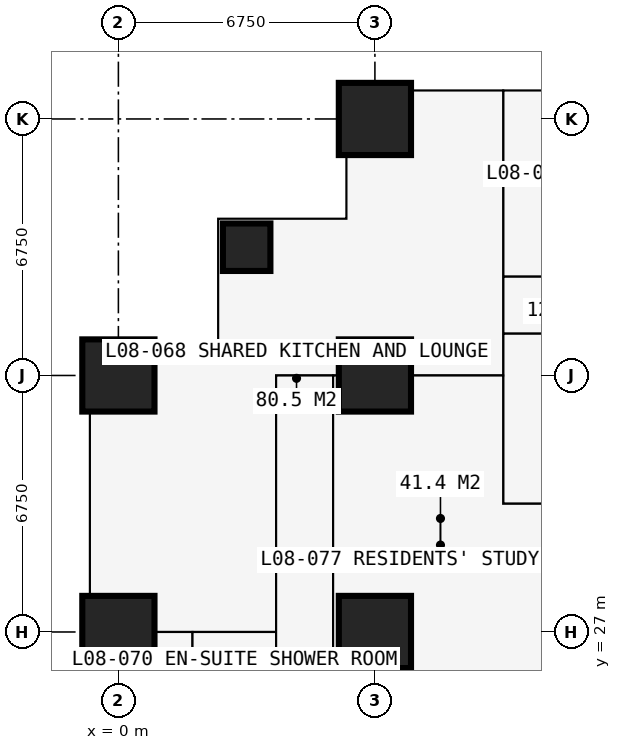
"""IFC4 building model, lengths in metres.
Left out: names, types, materials, properties, quantities, classifications, styles, units other than length and angle.
Written with IfcOpenShell. Run it as: python <this file> out.ifc"""

import sys

from ifc_helpers import new_model, si_unit, direction, frame, frame_2d, origin, origin_2d, place, context, subcontext, project, spatial, rectangle, extrude, element, fill, save


model = new_model("IFC4")
c1 = context("Model", 3, precision=1e-05, world=origin(), true_north=direction((0.0, 1.0)))
c2 = subcontext(c1, "Body", "Model", "MODEL_VIEW")
j1 = project(units=[si_unit("LENGTHUNIT", "METRE"), si_unit("PLANEANGLEUNIT", "RADIAN")], contexts=[c1])
p1 = place(None, origin())
s1 = spatial("IfcSite", under=j1, at=p1, CompositionType="ELEMENT")
p2 = place(p1, origin())
s2 = spatial("IfcBuilding", under=s1, at=p2, CompositionType="ELEMENT")
p3 = place(p2, frame((0.0, 0.0, 32.4)))
s3 = spatial("IfcBuildingStorey", under=s2, at=p3, CompositionType="ELEMENT", Elevation=32.4)
for number, where, z_axis, x_axis in (
    (1, (0.0, 27.0, 0.0), (0.0, 0.0, 1.0), (1.0, 0.0, 0.0)),
    (2, (0.0, 33.75, 0.0), (0.0, 0.0, 1.0), (1.0, 0.0, 0.0)),
):
    element("IfcColumn", number, at=place(p3, frame(where, z_axis=z_axis, x_axis=x_axis)), inside=s3, PredefinedType="COLUMN", context=c2, shape_type="SweptSolid", body=[
        extrude(rectangle(XDim=1.9, YDim=1.9, at=origin_2d()), origin(), (0.0, 0.0, 1.0), 3.6),
    ])
p4 = place(p3, frame((3.375, 37.125, 0.0), z_axis=(0.0, 0.0, 1.0), x_axis=(1.0, 0.0, 0.0)))
e3 = element("IfcColumn", 3, at=p4, inside=s3, PredefinedType="COLUMN", context=c2, shape_type="SweptSolid", body=[
    extrude(rectangle(XDim=1.25, YDim=1.25, at=origin_2d()), origin(), (0.0, 0.0, 1.0), 3.6),
])
for number, where, z_axis, x_axis in (
    (4, (6.75, 27.0, 0.0), (0.0, 0.0, 1.0), (1.0, 0.0, 0.0)),
    (5, (6.75, 33.75, 0.0), (0.0, 0.0, 1.0), (1.0, 0.0, 0.0)),
    (6, (6.75, 40.5, 0.0), (0.0, 0.0, 1.0), (1.0, 0.0, 0.0)),
):
    element("IfcColumn", number, at=place(p3, frame(where, z_axis=z_axis, x_axis=x_axis)), inside=s3, PredefinedType="COLUMN", context=c2, shape_type="SweptSolid", body=[
        extrude(rectangle(XDim=1.9, YDim=1.9, at=origin_2d()), origin(), (0.0, 0.0, 1.0), 3.6),
    ])
p5 = place(p3, frame((6.0, 41.25, 0.0), z_axis=(0.0, 0.0, 1.0), x_axis=(0.0, -1.0, 0.0)))
e7 = element("IfcWall", 7, at=p5, inside=s3, PredefinedType="SOLIDWALL", context=c2, shape_type="SweptSolid", body=[
    extrude(rectangle(XDim=3.375, YDim=0.3, at=frame_2d((1.688, 0.0))), origin(), (0.0, 0.0, 1.0), 3.375),
])
p6 = place(p5, frame((1.857, 0.0, 0.9)))
e8 = element("IfcOpeningElement", 8, at=p6, cuts=e7, PredefinedType="OPENING", context=c2, shape_type="SweptSolid", body=[
    extrude(rectangle(XDim=1.2, YDim=1.8, at=frame_2d((0.6, 0.9))), frame((0.0, 0.16, 0.0), z_axis=(0.0, -1.0, 0.0), x_axis=(1.0, 0.0, 0.0)), (0.0, 0.0, 1.0), 0.32),
])
p7 = place(p3, frame((6.0, 37.875, 0.0), z_axis=(0.0, 0.0, 1.0), x_axis=(-1.0, 0.0, 0.0)))
e9 = element("IfcWall", 9, at=p7, inside=s3, PredefinedType="SOLIDWALL", context=c2, shape_type="SweptSolid", body=[
    extrude(rectangle(XDim=3.375, YDim=0.3, at=frame_2d((1.688, 0.0))), origin(), (0.0, 0.0, 1.0), 3.375),
])
p8 = place(p7, frame((0.788, 0.0, 0.6)))
e10 = element("IfcOpeningElement", 10, at=p8, cuts=e9, PredefinedType="OPENING", context=c2, shape_type="SweptSolid", body=[
    extrude(rectangle(XDim=1.8, YDim=2.1, at=frame_2d((0.9, 1.05))), frame((0.0, 0.16, 0.0), z_axis=(0.0, -1.0, 0.0), x_axis=(1.0, 0.0, 0.0)), (0.0, 0.0, 1.0), 0.32),
])
p9 = place(p3, frame((2.625, 37.875, 0.0), z_axis=(0.0, 0.0, 1.0), x_axis=(0.0, -1.0, 0.0)))
e11 = element("IfcWall", 11, at=p9, inside=s3, PredefinedType="SOLIDWALL", context=c2, shape_type="SweptSolid", body=[
    extrude(rectangle(XDim=3.375, YDim=0.3, at=frame_2d((1.688, 0.0))), origin(), (0.0, 0.0, 1.0), 3.375),
])
p10 = place(p9, frame((0.788, 0.0, 0.6)))
e12 = element("IfcOpeningElement", 12, at=p10, cuts=e11, PredefinedType="OPENING", context=c2, shape_type="SweptSolid", body=[
    extrude(rectangle(XDim=1.8, YDim=2.1, at=frame_2d((0.9, 1.05))), frame((0.0, 0.16, 0.0), z_axis=(0.0, -1.0, 0.0), x_axis=(1.0, 0.0, 0.0)), (0.0, 0.0, 1.0), 0.32),
])
p11 = place(p3, frame((2.625, 34.5, 0.0), z_axis=(0.0, 0.0, 1.0), x_axis=(-1.0, 0.0, 0.0)))
e13 = element("IfcWall", 13, at=p11, inside=s3, PredefinedType="SOLIDWALL", context=c2, shape_type="SweptSolid", body=[
    extrude(rectangle(XDim=3.375, YDim=0.3, at=frame_2d((1.688, 0.0))), origin(), (0.0, 0.0, 1.0), 3.375),
])
p12 = place(p11, frame((0.317, 0.0, 0.9)))
e14 = element("IfcOpeningElement", 14, at=p12, cuts=e13, PredefinedType="OPENING", context=c2, shape_type="SweptSolid", body=[
    extrude(rectangle(XDim=1.2, YDim=1.8, at=frame_2d((0.6, 0.9))), frame((0.0, 0.16, 0.0), z_axis=(0.0, -1.0, 0.0), x_axis=(1.0, 0.0, 0.0)), (0.0, 0.0, 1.0), 0.32),
])
p13 = place(p3, frame((-0.734, 27.0, 0.0), z_axis=(0.0, 0.0, 1.0), x_axis=(1.0, 0.0, 0.0)))
e15 = element("IfcWall", 15, at=p13, inside=s3, PredefinedType="PARTITIONING", context=c2, shape_type="SweptSolid", body=[
    extrude(rectangle(XDim=4.884, YDim=0.15, at=frame_2d((2.442, 0.0))), origin(), (0.0, 0.0, 1.0), 2.61),
])
p14 = place(p3, frame((1.95, 25.0, 0.0), z_axis=(0.0, 0.0, 1.0), x_axis=(0.0, 1.0, 0.0)))
e16 = element("IfcWall", 16, at=p14, inside=s3, PredefinedType="PARTITIONING", context=c2, shape_type="SweptSolid", body=[
    extrude(rectangle(XDim=2.0, YDim=0.1, at=frame_2d((1.0, 0.0))), origin(), (0.0, 0.0, 1.0), 3.375),
])
p15 = place(p3, frame((4.15, 10.125, 0.0), z_axis=(0.0, 0.0, 1.0), x_axis=(0.0, 1.0, 0.0)))
e17 = element("IfcWall", 17, at=p15, inside=s3, PredefinedType="PARTITIONING", context=c2, shape_type="SweptSolid", body=[
    extrude(rectangle(XDim=23.625, YDim=0.15, at=frame_2d((11.812, 0.0))), origin(), (0.0, 0.0, 1.0), 3.375),
])
p16 = place(p15, frame((19.775, 0.0, 0.0)))
e18 = element("IfcOpeningElement", 18, at=p16, cuts=e17, PredefinedType="OPENING", context=c2, shape_type="SweptSolid", body=[
    extrude(rectangle(XDim=1.0, YDim=2.2, at=frame_2d((0.5, 1.1))), frame((0.0, 0.085, 0.0), z_axis=(0.0, -1.0, 0.0), x_axis=(1.0, 0.0, 0.0)), (0.0, 0.0, 1.0), 0.17),
])
p17 = place(p15, frame((13.7, 0.0, 0.0)))
e19 = element("IfcOpeningElement", 19, at=p17, cuts=e17, PredefinedType="OPENING", context=c2, shape_type="SweptSolid", body=[
    extrude(rectangle(XDim=0.95, YDim=2.2, at=frame_2d((0.475, 1.1))), frame((0.0, 0.085, 0.0), z_axis=(0.0, -1.0, 0.0), x_axis=(1.0, 0.0, 0.0)), (0.0, 0.0, 1.0), 0.17),
])
p18 = place(p15, frame((4.2, 0.0, 0.0)))
e20 = element("IfcOpeningElement", 20, at=p18, cuts=e17, PredefinedType="OPENING", context=c2, shape_type="SweptSolid", body=[
    extrude(rectangle(XDim=0.95, YDim=2.2, at=frame_2d((0.475, 1.1))), frame((0.0, 0.085, 0.0), z_axis=(0.0, -1.0, 0.0), x_axis=(1.0, 0.0, 0.0)), (0.0, 0.0, 1.0), 0.17),
])
p19 = place(p15, frame((10.95, 0.0, 0.0)))
e21 = element("IfcOpeningElement", 21, at=p19, cuts=e17, PredefinedType="OPENING", context=c2, shape_type="SweptSolid", body=[
    extrude(rectangle(XDim=0.95, YDim=2.2, at=frame_2d((0.475, 1.1))), frame((0.0, 0.085, 0.0), z_axis=(0.0, -1.0, 0.0), x_axis=(1.0, 0.0, 0.0)), (0.0, 0.0, 1.0), 0.17),
])
p20 = place(p3, frame((4.15, 33.75, 0.0), z_axis=(0.0, 0.0, 1.0), x_axis=(1.0, 0.0, 0.0)))
e22 = element("IfcWall", 22, at=p20, inside=s3, PredefinedType="PARTITIONING", context=c2, shape_type="SweptSolid", body=[
    extrude(rectangle(XDim=5.975, YDim=0.15, at=frame_2d((2.988, 0.0))), origin(), (0.0, 0.0, 1.0), 2.877),
])
p21 = place(p3, frame((5.65, 25.725, 0.0), z_axis=(0.0, 0.0, 1.0), x_axis=(0.0, 1.0, 0.0)))
e23 = element("IfcWall", 23, at=p21, inside=s3, PredefinedType="PARTITIONING", context=c2, shape_type="SweptSolid", body=[
    extrude(rectangle(XDim=8.025, YDim=0.15, at=frame_2d((4.012, 0.0))), origin(), (0.0, 0.0, 1.0), 3.375),
])
p22 = place(p3, frame((10.125, 30.375, 0.0), z_axis=(0.0, 0.0, 1.0), x_axis=(0.0, 1.0, 0.0)))
e24 = element("IfcWall", 24, at=p22, inside=s3, PredefinedType="PARTITIONING", context=c2, shape_type="SweptSolid", body=[
    extrude(rectangle(XDim=10.859, YDim=0.15, at=frame_2d((5.429, 0.0))), origin(), (0.0, 0.0, 1.0), 3.375),
])
p23 = place(p3, frame((10.125, 30.375, 0.0), z_axis=(0.0, 0.0, 1.0), x_axis=(1.0, 0.0, 0.0)))
e25 = element("IfcWall", 25, at=p23, inside=s3, PredefinedType="PARTITIONING", context=c2, shape_type="SweptSolid", body=[
    extrude(rectangle(XDim=1.175, YDim=0.15, at=frame_2d((0.587, 0.0))), origin(), (0.0, 0.0, 1.0), 3.375),
])
p24 = place(p3, frame((10.125, 34.85, 0.0), z_axis=(0.0, 0.0, 1.0), x_axis=(1.0, 0.0, 0.0)))
e26 = element("IfcWall", 26, at=p24, inside=s3, PredefinedType="PARTITIONING", context=c2, shape_type="SweptSolid", body=[
    extrude(rectangle(XDim=10.762, YDim=0.15, at=frame_2d((5.381, 0.0))), origin(), (0.0, 0.0, 1.0), 3.375),
])
p25 = place(p24, frame((4.9, 0.0, 0.0)))
e27 = element("IfcOpeningElement", 27, at=p25, cuts=e26, PredefinedType="OPENING", context=c2, shape_type="SweptSolid", body=[
    extrude(rectangle(XDim=0.95, YDim=2.2, at=frame_2d((0.475, 1.1))), frame((0.0, 0.085, 0.0), z_axis=(0.0, -1.0, 0.0), x_axis=(1.0, 0.0, 0.0)), (0.0, 0.0, 1.0), 0.17),
])
p26 = place(p3, frame((10.125, 36.35, 0.0), z_axis=(0.0, 0.0, 1.0), x_axis=(1.0, 0.0, 0.0)))
e28 = element("IfcWall", 28, at=p26, inside=s3, PredefinedType="PARTITIONING", context=c2, shape_type="SweptSolid", body=[
    extrude(rectangle(XDim=23.625, YDim=0.1, at=frame_2d((11.812, 0.0))), origin(), (0.0, 0.0, 1.0), 3.375),
])
p27 = place(p26, frame((20.5, 0.0, 0.0)))
e29 = element("IfcOpeningElement", 29, at=p27, cuts=e28, PredefinedType="OPENING", context=c2, shape_type="SweptSolid", body=[
    extrude(rectangle(XDim=0.95, YDim=2.2, at=frame_2d((0.475, 1.1))), frame((0.0, 0.06, 0.0), z_axis=(0.0, -1.0, 0.0), x_axis=(1.0, 0.0, 0.0)), (0.0, 0.0, 1.0), 0.12),
])
p28 = place(p26, frame((17.125, 0.0, 0.0)))
e30 = element("IfcOpeningElement", 30, at=p28, cuts=e28, PredefinedType="OPENING", context=c2, shape_type="SweptSolid", body=[
    extrude(rectangle(XDim=0.95, YDim=2.2, at=frame_2d((0.475, 1.1))), frame((0.0, 0.06, 0.0), z_axis=(0.0, -1.0, 0.0), x_axis=(1.0, 0.0, 0.0)), (0.0, 0.0, 1.0), 0.12),
])
p29 = place(p26, frame((13.7, 0.0, 0.0)))
e31 = element("IfcOpeningElement", 31, at=p29, cuts=e28, PredefinedType="OPENING", context=c2, shape_type="SweptSolid", body=[
    extrude(rectangle(XDim=0.95, YDim=2.2, at=frame_2d((0.475, 1.1))), frame((0.0, 0.06, 0.0), z_axis=(0.0, -1.0, 0.0), x_axis=(1.0, 0.0, 0.0)), (0.0, 0.0, 1.0), 0.12),
])
p30 = place(p26, frame((0.2, 0.0, 0.0)))
e32 = element("IfcOpeningElement", 32, at=p30, cuts=e28, PredefinedType="OPENING", context=c2, shape_type="SweptSolid", body=[
    extrude(rectangle(XDim=0.95, YDim=2.2, at=frame_2d((0.475, 1.1))), frame((0.0, 0.06, 0.0), z_axis=(0.0, -1.0, 0.0), x_axis=(1.0, 0.0, 0.0)), (0.0, 0.0, 1.0), 0.12),
])
p31 = place(p26, frame((3.625, 0.0, 0.0)))
e33 = element("IfcOpeningElement", 33, at=p31, cuts=e28, PredefinedType="OPENING", context=c2, shape_type="SweptSolid", body=[
    extrude(rectangle(XDim=0.95, YDim=2.2, at=frame_2d((0.475, 1.1))), frame((0.0, 0.06, 0.0), z_axis=(0.0, -1.0, 0.0), x_axis=(1.0, 0.0, 0.0)), (0.0, 0.0, 1.0), 0.12),
])
p32 = place(p26, frame((7.0, 0.0, 0.0)))
e34 = element("IfcOpeningElement", 34, at=p32, cuts=e28, PredefinedType="OPENING", context=c2, shape_type="SweptSolid", body=[
    extrude(rectangle(XDim=0.95, YDim=2.2, at=frame_2d((0.475, 1.1))), frame((0.0, 0.06, 0.0), z_axis=(0.0, -1.0, 0.0), x_axis=(1.0, 0.0, 0.0)), (0.0, 0.0, 1.0), 0.12),
])
p33 = place(p26, frame((10.375, 0.0, 0.0)))
e35 = element("IfcOpeningElement", 35, at=p33, cuts=e28, PredefinedType="OPENING", context=c2, shape_type="SweptSolid", body=[
    extrude(rectangle(XDim=0.95, YDim=2.2, at=frame_2d((0.475, 1.1))), frame((0.0, 0.06, 0.0), z_axis=(0.0, -1.0, 0.0), x_axis=(1.0, 0.0, 0.0)), (0.0, 0.0, 1.0), 0.12),
])
p34 = place(p6, origin())
e36 = element("IfcWindow", 36, at=p34, inside=s3, PartitioningType="SINGLE_PANEL", PredefinedType="WINDOW", context=c2, shape_type="SweptSolid", body=[
    extrude(rectangle(XDim=1.2, YDim=1.8, at=frame_2d((0.6, 0.9))), frame((0.0, 0.03, 0.0), z_axis=(0.0, -1.0, 0.0), x_axis=(1.0, 0.0, 0.0)), (0.0, 0.0, 1.0), 0.06),
])
fill(e8, e36)
p35 = place(p8, origin())
e37 = element("IfcWindow", 37, at=p35, inside=s3, PartitioningType="SINGLE_PANEL", PredefinedType="WINDOW", context=c2, shape_type="SweptSolid", body=[
    extrude(rectangle(XDim=1.8, YDim=2.1, at=frame_2d((0.9, 1.05))), frame((0.0, 0.03, 0.0), z_axis=(0.0, -1.0, 0.0), x_axis=(1.0, 0.0, 0.0)), (0.0, 0.0, 1.0), 0.06),
])
fill(e10, e37)
p36 = place(p10, origin())
e38 = element("IfcWindow", 38, at=p36, inside=s3, PartitioningType="SINGLE_PANEL", PredefinedType="WINDOW", context=c2, shape_type="SweptSolid", body=[
    extrude(rectangle(XDim=1.8, YDim=2.1, at=frame_2d((0.9, 1.05))), frame((0.0, 0.03, 0.0), z_axis=(0.0, -1.0, 0.0), x_axis=(1.0, 0.0, 0.0)), (0.0, 0.0, 1.0), 0.06),
])
fill(e12, e38)
p37 = place(p12, origin())
e39 = element("IfcWindow", 39, at=p37, inside=s3, PartitioningType="SINGLE_PANEL", PredefinedType="WINDOW", context=c2, shape_type="SweptSolid", body=[
    extrude(rectangle(XDim=1.2, YDim=1.8, at=frame_2d((0.6, 0.9))), frame((0.0, 0.03, 0.0), z_axis=(0.0, -1.0, 0.0), x_axis=(1.0, 0.0, 0.0)), (0.0, 0.0, 1.0), 0.06),
])
fill(e14, e39)
p38 = place(p30, origin())
e40 = element("IfcDoor", 40, at=p38, inside=s3, OperationType="SINGLE_SWING_LEFT", PredefinedType="DOOR", context=c2, shape_type="SweptSolid", body=[
    extrude(rectangle(XDim=0.95, YDim=2.2, at=frame_2d((0.475, 1.1))), frame((0.0, 0.025, 0.0), z_axis=(0.0, -1.0, 0.0), x_axis=(1.0, 0.0, 0.0)), (0.0, 0.0, 1.0), 0.05),
])
fill(e32, e40)
p39 = place(p16, origin())
e41 = element("IfcDoor", 41, at=p39, inside=s3, OperationType="SINGLE_SWING_LEFT", PredefinedType="DOOR", context=c2, shape_type="SweptSolid", body=[
    extrude(rectangle(XDim=1.0, YDim=2.2, at=frame_2d((0.5, 1.1))), frame((0.0, 0.025, 0.0), z_axis=(0.0, -1.0, 0.0), x_axis=(1.0, 0.0, 0.0)), (0.0, 0.0, 1.0), 0.05),
])
fill(e18, e41)
save(model, sys.argv[1])
